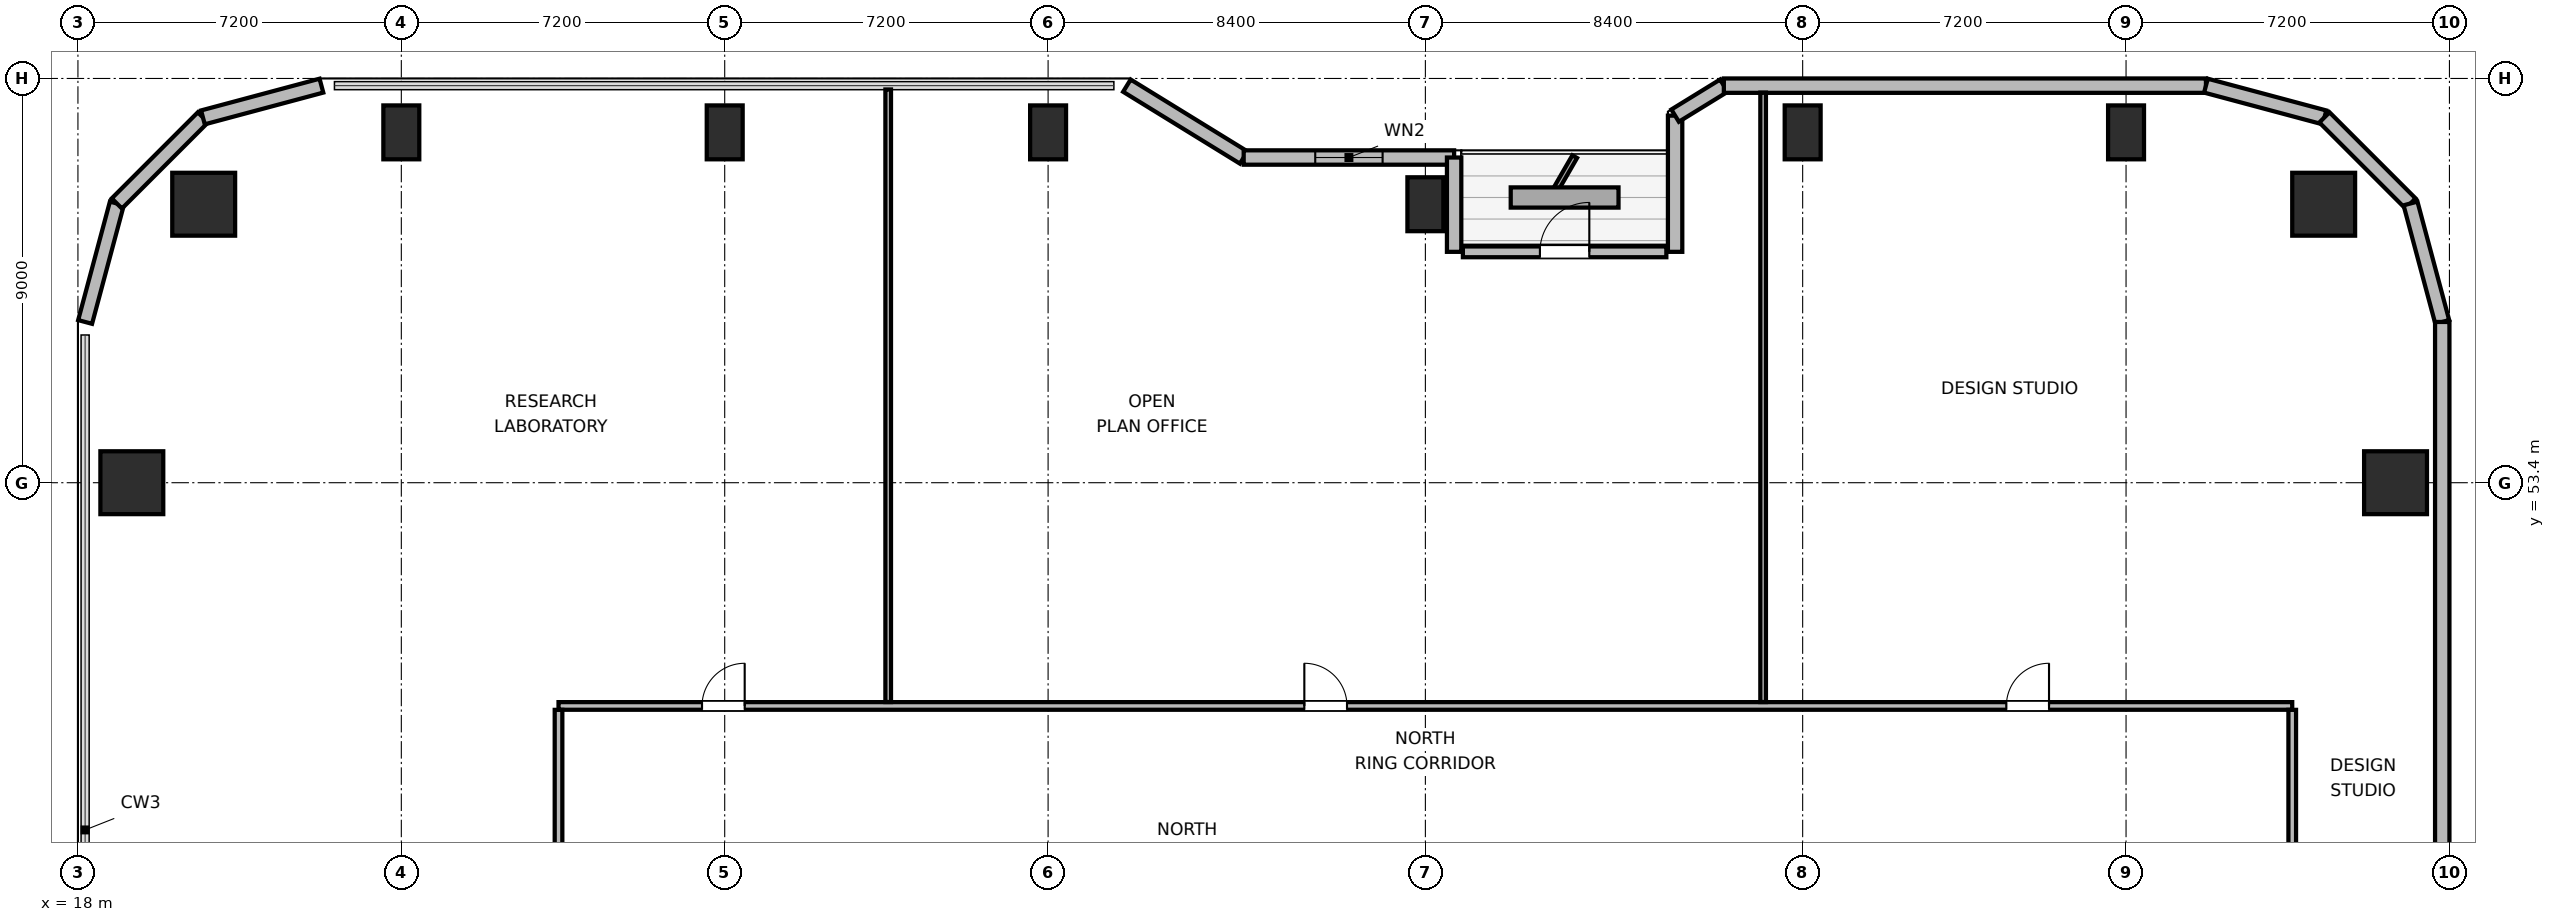
"""IFC4 building model, lengths in metres.
Left out: names, types, materials, properties, quantities, classifications, styles, units other than length and angle.
Written with IfcOpenShell. Run it as: python <this file> out.ifc"""

import sys

from ifc_helpers import new_model, si_unit, direction, frame, frame_2d, origin, origin_2d, place, context, subcontext, project, spatial, rectangle, circle, extrude, element, fill, save


model = new_model("IFC4")
c1 = context("Model", 3, precision=1e-05, world=origin(), true_north=direction((0.0, 1.0)))
c2 = subcontext(c1, "Body", "Model", "MODEL_VIEW")
j1 = project(units=[si_unit("LENGTHUNIT", "METRE"), si_unit("PLANEANGLEUNIT", "RADIAN")], contexts=[c1])
p1 = place(None, origin())
s1 = spatial("IfcSite", under=j1, at=p1, CompositionType="ELEMENT")
p2 = place(p1, origin())
s2 = spatial("IfcBuilding", under=s1, at=p2, CompositionType="ELEMENT")
p3 = place(p2, frame((0.0, 0.0, 109.2)))
s3 = spatial("IfcBuildingStorey", under=s2, at=p3, CompositionType="ELEMENT", Elevation=109.2)
for number, where, z_axis, x_axis in (
    (1, (68.0, 59.6, 0.0), (0.0, 0.0, 1.0), (1.0, 0.0, 0.0)),
    (2, (20.8, 59.6, 0.0), (0.0, 0.0, 1.0), (1.0, 0.0, 0.0)),
):
    element("IfcColumn", number, at=place(p3, frame(where, z_axis=z_axis, x_axis=x_axis)), inside=s3, PredefinedType="COLUMN", context=c2, shape_type="SweptSolid", body=[
        extrude(circle(Radius=0.7, at=origin_2d()), origin(), (0.0, 0.0, 1.0), 3.9),
    ])
for number, where, z_axis, x_axis in (
    (3, (25.2, 61.2, 0.0), (0.0, 0.0, 1.0), (1.0, 0.0, 0.0)),
    (4, (32.4, 61.2, 0.0), (0.0, 0.0, 1.0), (1.0, 0.0, 0.0)),
    (5, (39.6, 61.2, 0.0), (0.0, 0.0, 1.0), (1.0, 0.0, 0.0)),
    (6, (48.0, 59.6, 0.0), (0.0, 0.0, 1.0), (1.0, 0.0, 0.0)),
    (7, (56.4, 61.2, 0.0), (0.0, 0.0, 1.0), (1.0, 0.0, 0.0)),
    (8, (63.6, 61.2, 0.0), (0.0, 0.0, 1.0), (1.0, 0.0, 0.0)),
):
    element("IfcColumn", number, at=place(p3, frame(where, z_axis=z_axis, x_axis=x_axis)), inside=s3, PredefinedType="COLUMN", context=c2, shape_type="SweptSolid", body=[
        extrude(rectangle(XDim=0.8, YDim=1.2, at=origin_2d()), origin(), (0.0, 0.0, 1.0), 3.9),
    ])
for number, where, z_axis, x_axis in (
    (9, (19.2, 53.4, 0.0), (0.0, 0.0, 1.0), (1.0, 0.0, 0.0)),
    (10, (69.6, 53.4, 0.0), (0.0, 0.0, 1.0), (1.0, 0.0, 0.0)),
):
    element("IfcColumn", number, at=place(p3, frame(where, z_axis=z_axis, x_axis=x_axis)), inside=s3, PredefinedType="COLUMN", context=c2, shape_type="SweptSolid", body=[
        extrude(rectangle(XDim=1.4, YDim=1.4, at=origin_2d()), origin(), (0.0, 0.0, 1.0), 3.9),
    ])
p4 = place(p3, frame((18.16, 56.979, 0.0), z_axis=(0.0, 0.0, 1.0), x_axis=(0.25869736047, 0.965958423373, 0.0)))
e11 = element("IfcWall", 11, at=p4, inside=s3, PredefinedType="SOLIDWALL", context=c2, shape_type="SweptSolid", body=[
    extrude(rectangle(XDim=2.731, YDim=0.32, at=frame_2d((1.366, 0.0))), origin(), (0.0, 0.0, 1.0), 3.64),
])
p5 = place(p3, frame((18.866, 59.617, 0.0), z_axis=(0.0, 0.0, 1.0), x_axis=(0.707106781187, 0.707106781187, 0.0)))
e12 = element("IfcWall", 12, at=p5, inside=s3, PredefinedType="SOLIDWALL", context=c2, shape_type="SweptSolid", body=[
    extrude(rectangle(XDim=2.71, YDim=0.32, at=frame_2d((1.355, 0.0))), origin(), (0.0, 0.0, 1.0), 3.64),
])
p6 = place(p3, frame((20.783, 61.533, 0.0), z_axis=(0.0, 0.0, 1.0), x_axis=(0.965964405026, 0.25867502435, 0.0)))
e13 = element("IfcWall", 13, at=p6, inside=s3, PredefinedType="SOLIDWALL", context=c2, shape_type="SweptSolid", body=[
    extrude(rectangle(XDim=2.731, YDim=0.32, at=frame_2d((1.366, 0.0))), origin(), (0.0, 0.0, 1.0), 3.64),
])
p7 = place(p3, frame((41.355, 62.24, 0.0), z_axis=(0.0, 0.0, 1.0), x_axis=(0.851630857047, -0.524142044989, 0.0)))
e14 = element("IfcWall", 14, at=p7, inside=s3, PredefinedType="SOLIDWALL", context=c2, shape_type="SweptSolid", body=[
    extrude(rectangle(XDim=3.053, YDim=0.32, at=frame_2d((1.526, 0.0))), origin(), (0.0, 0.0, 1.0), 2.875),
])
p8 = place(p3, frame((43.955, 60.64, 0.0), z_axis=(0.0, 0.0, 1.0), x_axis=(1.0, 0.0, 0.0)))
e15 = element("IfcWall", 15, at=p8, inside=s3, PredefinedType="SOLIDWALL", context=c2, shape_type="SweptSolid", body=[
    extrude(rectangle(XDim=4.685, YDim=0.32, at=frame_2d((2.343, 0.0))), origin(), (0.0, 0.0, 1.0), 2.875),
])
p9 = place(p8, frame((1.593, 0.0, 0.85)))
e16 = element("IfcOpeningElement", 16, at=p9, cuts=e15, PredefinedType="OPENING", context=c2, shape_type="SweptSolid", body=[
    extrude(rectangle(XDim=1.5, YDim=1.1, at=frame_2d((0.75, 0.55))), frame((0.0, 0.17, 0.0), z_axis=(0.0, -1.0, 0.0), x_axis=(1.0, 0.0, 0.0)), (0.0, 0.0, 1.0), 0.34),
])
p10 = place(p3, frame((48.64, 60.64, 0.0), z_axis=(0.0, 0.0, 1.0), x_axis=(0.0, -1.0, 0.0)))
e17 = element("IfcWall", 17, at=p10, inside=s3, PredefinedType="SOLIDWALL", context=c2, shape_type="SweptSolid", body=[
    extrude(rectangle(XDim=2.1, YDim=0.32, at=frame_2d((1.05, 0.0))), origin(), (0.0, 0.0, 1.0), 2.875),
])
p11 = place(p3, frame((48.835, 58.54, 0.0), z_axis=(0.0, 0.0, 1.0), x_axis=(1.0, 0.0, 0.0)))
e18 = element("IfcWall", 18, at=p11, inside=s3, PredefinedType="SOLIDWALL", context=c2, shape_type="SweptSolid", body=[
    extrude(rectangle(XDim=4.53, YDim=0.24, at=frame_2d((2.265, 0.0))), origin(), (0.0, 0.0, 1.0), 3.64),
])
p12 = place(p11, frame((1.715, 0.0, 0.0)))
e19 = element("IfcOpeningElement", 19, at=p12, cuts=e18, PredefinedType="OPENING", context=c2, shape_type="SweptSolid", body=[
    extrude(rectangle(XDim=1.1, YDim=2.04, at=frame_2d((0.55, 1.02))), frame((0.0, 0.13, 0.0), z_axis=(0.0, -1.0, 0.0), x_axis=(1.0, 0.0, 0.0)), (0.0, 0.0, 1.0), 0.26),
])
p13 = place(p3, frame((53.56, 58.54, 0.0), z_axis=(0.0, 0.0, 1.0), x_axis=(0.0, 1.0, 0.0)))
e20 = element("IfcWall", 20, at=p13, inside=s3, PredefinedType="SOLIDWALL", context=c2, shape_type="SweptSolid", body=[
    extrude(rectangle(XDim=3.032, YDim=0.32, at=frame_2d((1.516, 0.0))), origin(), (0.0, 0.0, 1.0), 2.875),
])
p14 = place(p3, frame((53.56, 61.573, 0.0), z_axis=(0.0, 0.0, 1.0), x_axis=(0.851776724646, 0.523904964045, 0.0)))
e21 = element("IfcWall", 21, at=p14, inside=s3, PredefinedType="SOLIDWALL", context=c2, shape_type="SweptSolid", body=[
    extrude(rectangle(XDim=1.274, YDim=0.32, at=frame_2d((0.637, 0.0))), origin(), (0.0, 0.0, 1.0), 3.64),
])
p15 = place(p3, frame((54.645, 62.24, 0.0), z_axis=(0.0, 0.0, 1.0), x_axis=(1.0, 0.0, 0.0)))
e22 = element("IfcWall", 22, at=p15, inside=s3, PredefinedType="SOLIDWALL", context=c2, shape_type="SweptSolid", body=[
    extrude(rectangle(XDim=10.734, YDim=0.32, at=frame_2d((5.367, 0.0))), origin(), (0.0, 0.0, 1.0), 3.64),
])
p16 = place(p3, frame((65.379, 62.24, 0.0), z_axis=(0.0, 0.0, 1.0), x_axis=(0.965958423373, -0.25869736047, 0.0)))
e23 = element("IfcWall", 23, at=p16, inside=s3, PredefinedType="SOLIDWALL", context=c2, shape_type="SweptSolid", body=[
    extrude(rectangle(XDim=2.731, YDim=0.32, at=frame_2d((1.366, 0.0))), origin(), (0.0, 0.0, 1.0), 3.64),
])
p17 = place(p3, frame((68.017, 61.533, 0.0), z_axis=(0.0, 0.0, 1.0), x_axis=(0.707151821269, -0.707061738235, 0.0)))
e24 = element("IfcWall", 24, at=p17, inside=s3, PredefinedType="SOLIDWALL", context=c2, shape_type="SweptSolid", body=[
    extrude(rectangle(XDim=2.71, YDim=0.32, at=frame_2d((1.355, 0.0))), origin(), (0.0, 0.0, 1.0), 3.64),
])
p18 = place(p3, frame((69.934, 59.617, 0.0), z_axis=(0.0, 0.0, 1.0), x_axis=(0.258613949072, -0.965980758269, 0.0)))
e25 = element("IfcWall", 25, at=p18, inside=s3, PredefinedType="SOLIDWALL", context=c2, shape_type="SweptSolid", body=[
    extrude(rectangle(XDim=2.731, YDim=0.32, at=frame_2d((1.366, 0.0))), origin(), (0.0, 0.0, 1.0), 3.64),
])
p19 = place(p3, frame((70.64, 56.979, 0.0), z_axis=(0.0, 0.0, 1.0), x_axis=(0.0, -1.0, 0.0)))
e26 = element("IfcWall", 26, at=p19, inside=s3, PredefinedType="SOLIDWALL", context=c2, shape_type="SweptSolid", body=[
    extrude(rectangle(XDim=14.219, YDim=0.32, at=frame_2d((7.109, 0.0))), origin(), (0.0, 0.0, 1.0), 3.64),
])
p20 = place(p3, frame((28.7, 48.43, 0.0), z_axis=(0.0, 0.0, 1.0), x_axis=(1.0, 0.0, 0.0)))
e27 = element("IfcWall", 27, at=p20, inside=s3, PredefinedType="PARTITIONING", context=c2, shape_type="SweptSolid", body=[
    extrude(rectangle(XDim=38.6, YDim=0.17, at=frame_2d((19.3, 0.0))), origin(), (0.0, 0.0, 1.0), 3.64),
])
p21 = place(p20, frame((3.195, 0.0, 0.0)))
e28 = element("IfcOpeningElement", 28, at=p21, cuts=e27, PredefinedType="OPENING", context=c2, shape_type="SweptSolid", body=[
    extrude(rectangle(XDim=0.95, YDim=2.04, at=frame_2d((0.475, 1.02))), frame((0.0, 0.095, 0.0), z_axis=(0.0, -1.0, 0.0), x_axis=(1.0, 0.0, 0.0)), (0.0, 0.0, 1.0), 0.19),
])
p22 = place(p20, frame((16.605, 0.0, 0.0)))
e29 = element("IfcOpeningElement", 29, at=p22, cuts=e27, PredefinedType="OPENING", context=c2, shape_type="SweptSolid", body=[
    extrude(rectangle(XDim=0.95, YDim=2.04, at=frame_2d((0.475, 1.02))), frame((0.0, 0.095, 0.0), z_axis=(0.0, -1.0, 0.0), x_axis=(1.0, 0.0, 0.0)), (0.0, 0.0, 1.0), 0.19),
])
p23 = place(p20, frame((32.235, 0.0, 0.0)))
e30 = element("IfcOpeningElement", 30, at=p23, cuts=e27, PredefinedType="OPENING", context=c2, shape_type="SweptSolid", body=[
    extrude(rectangle(XDim=0.95, YDim=2.04, at=frame_2d((0.475, 1.02))), frame((0.0, 0.095, 0.0), z_axis=(0.0, -1.0, 0.0), x_axis=(1.0, 0.0, 0.0)), (0.0, 0.0, 1.0), 0.19),
])
p24 = place(p3, frame((28.7, 23.657, 0.0), z_axis=(0.0, 0.0, 1.0), x_axis=(0.0, 1.0, 0.0)))
e31 = element("IfcWall", 31, at=p24, inside=s3, PredefinedType="PARTITIONING", context=c2, shape_type="SweptSolid", body=[
    extrude(rectangle(XDim=24.686, YDim=0.17, at=frame_2d((12.343, 0.0))), origin(), (0.0, 0.0, 1.0), 3.64),
])
p25 = place(p24, frame((5.253, 0.0, 0.0)))
e32 = element("IfcOpeningElement", 32, at=p25, cuts=e31, PredefinedType="OPENING", context=c2, shape_type="SweptSolid", body=[
    extrude(rectangle(XDim=0.95, YDim=2.04, at=frame_2d((0.475, 1.02))), frame((0.0, 0.095, 0.0), z_axis=(0.0, -1.0, 0.0), x_axis=(1.0, 0.0, 0.0)), (0.0, 0.0, 1.0), 0.19),
])
p26 = place(p24, frame((17.683, 0.0, 0.0)))
e33 = element("IfcOpeningElement", 33, at=p26, cuts=e31, PredefinedType="OPENING", context=c2, shape_type="SweptSolid", body=[
    extrude(rectangle(XDim=0.95, YDim=2.04, at=frame_2d((0.475, 1.02))), frame((0.0, 0.095, 0.0), z_axis=(0.0, -1.0, 0.0), x_axis=(1.0, 0.0, 0.0)), (0.0, 0.0, 1.0), 0.19),
])
p27 = place(p3, frame((67.3, 23.657, 0.0), z_axis=(0.0, 0.0, 1.0), x_axis=(0.0, 1.0, 0.0)))
e34 = element("IfcWall", 34, at=p27, inside=s3, PredefinedType="PARTITIONING", context=c2, shape_type="SweptSolid", body=[
    extrude(rectangle(XDim=24.686, YDim=0.17, at=frame_2d((12.343, 0.0))), origin(), (0.0, 0.0, 1.0), 3.64),
])
p28 = place(p27, frame((5.153, 0.0, 0.0)))
e35 = element("IfcOpeningElement", 35, at=p28, cuts=e34, PredefinedType="OPENING", context=c2, shape_type="SweptSolid", body=[
    extrude(rectangle(XDim=0.95, YDim=2.04, at=frame_2d((0.475, 1.02))), frame((0.0, 0.095, 0.0), z_axis=(0.0, -1.0, 0.0), x_axis=(1.0, 0.0, 0.0)), (0.0, 0.0, 1.0), 0.19),
])
p29 = place(p27, frame((17.583, 0.0, 0.0)))
e36 = element("IfcOpeningElement", 36, at=p29, cuts=e34, PredefinedType="OPENING", context=c2, shape_type="SweptSolid", body=[
    extrude(rectangle(XDim=0.95, YDim=2.04, at=frame_2d((0.475, 1.02))), frame((0.0, 0.095, 0.0), z_axis=(0.0, -1.0, 0.0), x_axis=(1.0, 0.0, 0.0)), (0.0, 0.0, 1.0), 0.19),
])
p30 = place(p3, frame((36.04, 48.517, 0.0), z_axis=(0.0, 0.0, 1.0), x_axis=(0.0, 1.0, 0.0)))
e37 = element("IfcWall", 37, at=p30, inside=s3, PredefinedType="PARTITIONING", context=c2, shape_type="SweptSolid", body=[
    extrude(rectangle(XDim=13.638, YDim=0.125, at=frame_2d((6.819, 0.0))), origin(), (0.0, 0.0, 1.0), 3.64),
])
p31 = place(p3, frame((55.52, 48.517, 0.0), z_axis=(0.0, 0.0, 1.0), x_axis=(0.0, 1.0, 0.0)))
e38 = element("IfcWall", 38, at=p31, inside=s3, PredefinedType="PARTITIONING", context=c2, shape_type="SweptSolid", body=[
    extrude(rectangle(XDim=13.568, YDim=0.125, at=frame_2d((6.784, 0.0))), origin(), (0.0, 0.0, 1.0), 3.003),
])
p32 = place(p9, origin())
e39 = element("IfcWindow", 39, at=p32, inside=s3, PartitioningType="SINGLE_PANEL", PredefinedType="WINDOW", context=c2, shape_type="SweptSolid", body=[
    extrude(rectangle(XDim=1.5, YDim=1.1, at=frame_2d((0.75, 0.55))), frame((0.0, 0.03, 0.0), z_axis=(0.0, -1.0, 0.0), x_axis=(1.0, 0.0, 0.0)), (0.0, 0.0, 1.0), 0.06),
])
fill(e16, e39)
p33 = place(p12, origin())
e40 = element("IfcDoor", 40, at=p33, inside=s3, OperationType="SINGLE_SWING_RIGHT", PredefinedType="DOOR", context=c2, shape_type="SweptSolid", body=[
    extrude(rectangle(XDim=1.1, YDim=2.04, at=frame_2d((0.55, 1.02))), frame((0.0, 0.025, 0.0), z_axis=(0.0, -1.0, 0.0), x_axis=(1.0, 0.0, 0.0)), (0.0, 0.0, 1.0), 0.05),
])
fill(e19, e40)
p34 = place(p21, origin())
e41 = element("IfcDoor", 41, at=p34, inside=s3, OperationType="SINGLE_SWING_RIGHT", PredefinedType="DOOR", context=c2, shape_type="SweptSolid", body=[
    extrude(rectangle(XDim=0.95, YDim=2.04, at=frame_2d((0.475, 1.02))), frame((0.0, 0.025, 0.0), z_axis=(0.0, -1.0, 0.0), x_axis=(1.0, 0.0, 0.0)), (0.0, 0.0, 1.0), 0.05),
])
fill(e28, e41)
p35 = place(p22, origin())
e42 = element("IfcDoor", 42, at=p35, inside=s3, OperationType="SINGLE_SWING_LEFT", PredefinedType="DOOR", context=c2, shape_type="SweptSolid", body=[
    extrude(rectangle(XDim=0.95, YDim=2.04, at=frame_2d((0.475, 1.02))), frame((0.0, 0.025, 0.0), z_axis=(0.0, -1.0, 0.0), x_axis=(1.0, 0.0, 0.0)), (0.0, 0.0, 1.0), 0.05),
])
fill(e29, e42)
p36 = place(p23, origin())
e43 = element("IfcDoor", 43, at=p36, inside=s3, OperationType="SINGLE_SWING_RIGHT", PredefinedType="DOOR", context=c2, shape_type="SweptSolid", body=[
    extrude(rectangle(XDim=0.95, YDim=2.04, at=frame_2d((0.475, 1.02))), frame((0.0, 0.025, 0.0), z_axis=(0.0, -1.0, 0.0), x_axis=(1.0, 0.0, 0.0)), (0.0, 0.0, 1.0), 0.05),
])
fill(e30, e43)
save(model, sys.argv[1])
